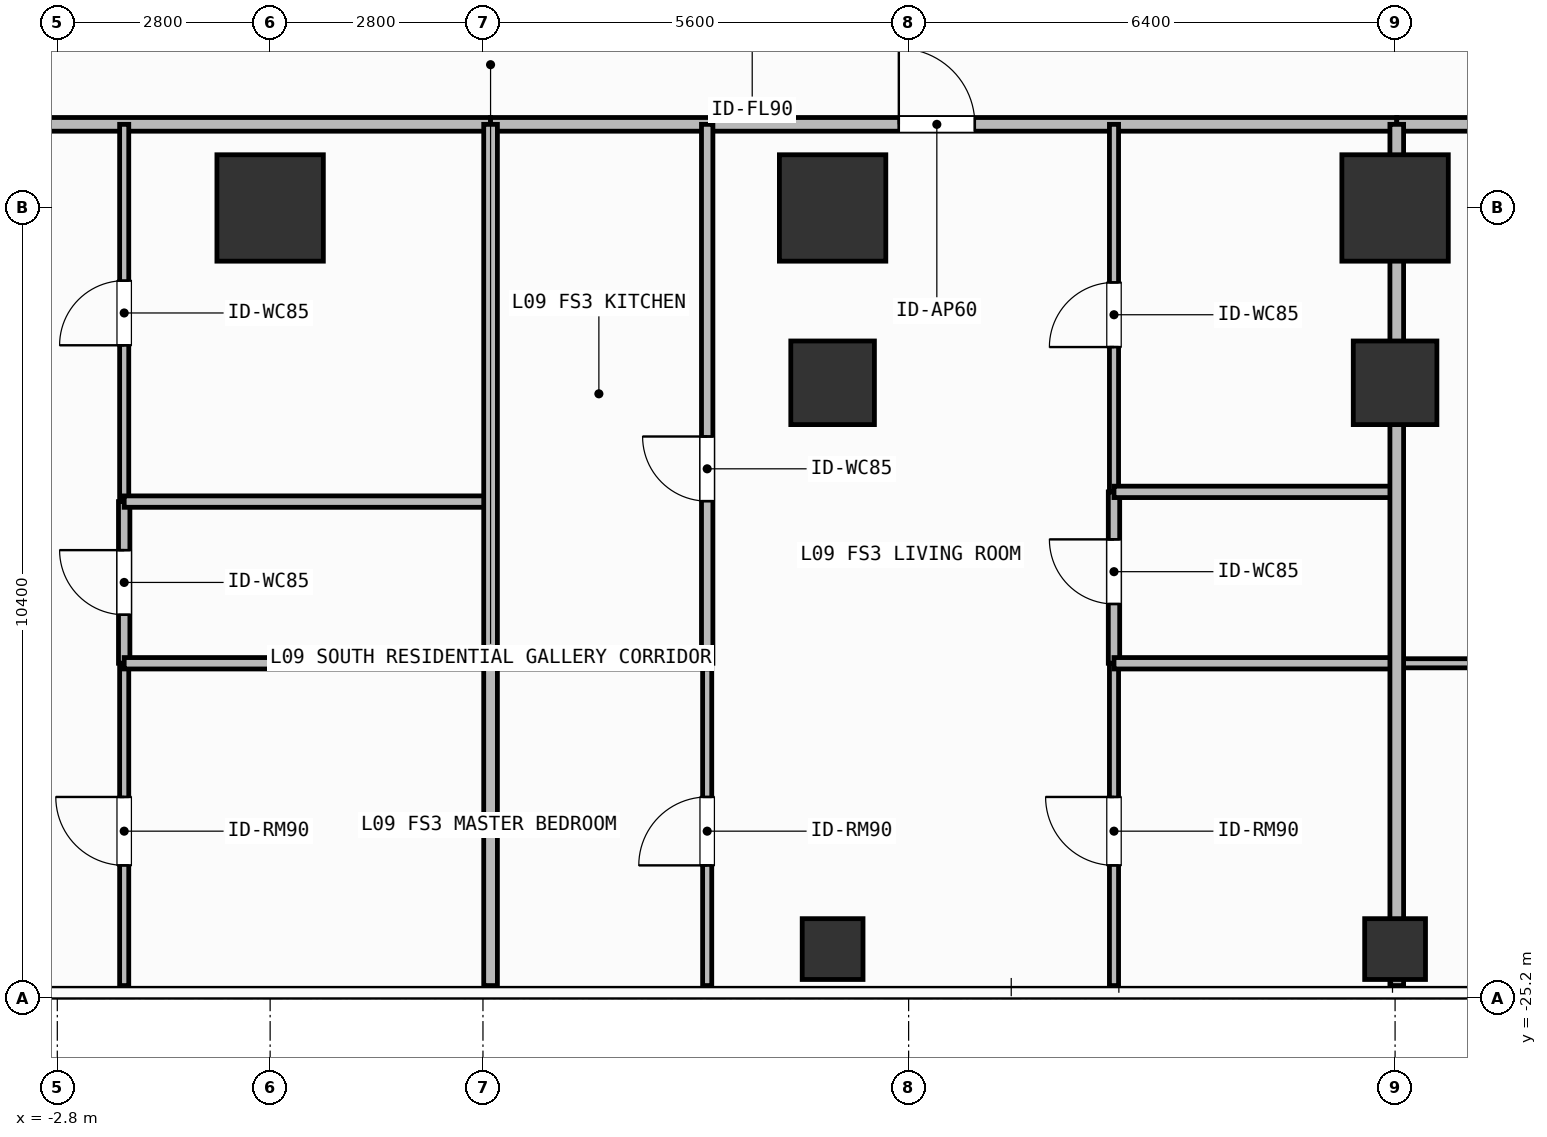
"""IFC4 building model, lengths in metres.
Left out: names, types, materials, properties, quantities, classifications, styles, units other than length and angle.
Written with IfcOpenShell. Run it as: python <this file> out.ifc"""

import sys

from ifc_helpers import new_model, si_unit, direction, frame, frame_2d, origin, origin_2d, place, context, subcontext, project, spatial, rectangle, hollow_rectangle, extrude, element, fill, save


model = new_model("IFC4")
c1 = context("Model", 3, precision=1e-05, world=origin(), true_north=direction((0.0, 1.0)))
c2 = subcontext(c1, "Body", "Model", "MODEL_VIEW")
j1 = project(units=[si_unit("LENGTHUNIT", "METRE"), si_unit("PLANEANGLEUNIT", "RADIAN")], contexts=[c1])
p1 = place(None, origin())
s1 = spatial("IfcSite", under=j1, at=p1, CompositionType="ELEMENT")
p2 = place(p1, origin())
s2 = spatial("IfcBuilding", under=s1, at=p2, CompositionType="ELEMENT")
p3 = place(p2, frame((0.0, 0.0, 34.5)))
s3 = spatial("IfcBuildingStorey", under=s2, at=p3, CompositionType="ELEMENT", Elevation=34.5)
for number, where, z_axis, x_axis in (
    (1, (0.0, -14.8, 0.0), (0.0, 0.0, 1.0), (1.0, 0.0, 0.0)),
    (2, (7.4, -14.8, 0.0), (0.0, 0.0, 1.0), (1.0, 0.0, 0.0)),
    (3, (14.8, -14.8, 0.0), (0.0, 0.0, 1.0), (1.0, 0.0, 0.0)),
):
    element("IfcColumn", number, at=place(p3, frame(where, z_axis=z_axis, x_axis=x_axis)), inside=s3, PredefinedType="COLUMN", context=c2, shape_type="SweptSolid", body=[
        extrude(rectangle(XDim=1.4, YDim=1.4, at=origin_2d()), origin(), (0.0, 0.0, 1.0), 3.9),
    ])
for number, where, z_axis, x_axis in (
    (4, (7.4, -17.1, 0.0), (0.0, 0.0, 1.0), (1.0, 0.0, 0.0)),
    (5, (14.8, -17.1, 0.0), (0.0, 0.0, 1.0), (1.0, 0.0, 0.0)),
):
    element("IfcColumn", number, at=place(p3, frame(where, z_axis=z_axis, x_axis=x_axis)), inside=s3, PredefinedType="COLUMN", context=c2, shape_type="SweptSolid", body=[
        extrude(rectangle(XDim=1.1, YDim=1.1, at=origin_2d()), origin(), (0.0, 0.0, 1.0), 3.9),
    ])
for number, where, z_axis, x_axis in (
    (6, (7.4, -24.55, 0.0), (0.0, 0.0, 1.0), (1.0, 0.0, 0.0)),
    (7, (14.8, -24.55, 0.0), (0.0, 0.0, 1.0), (1.0, 0.0, 0.0)),
):
    element("IfcColumn", number, at=place(p3, frame(where, z_axis=z_axis, x_axis=x_axis)), inside=s3, PredefinedType="COLUMN", context=c2, shape_type="SweptSolid", body=[
        extrude(hollow_rectangle(XDim=0.8, YDim=0.8, WallThickness=0.036, at=origin_2d()), origin(), (0.0, 0.0, 1.0), 3.9),
    ])
p4 = place(p3, frame((-9.151, -13.7, 0.0), z_axis=(0.0, 0.0, 1.0), x_axis=(1.0, 0.0, 0.0)))
e8 = element("IfcWall", 8, at=p4, inside=s3, PredefinedType="PARTITIONING", context=c2, shape_type="SweptSolid", body=[
    extrude(rectangle(XDim=12.051, YDim=0.18, at=frame_2d((6.025, 0.0))), origin(), (0.0, 0.0, 1.0), 3.68),
])
p5 = place(p4, frame((4.989, 0.0, 0.0)))
e9 = element("IfcOpeningElement", 9, at=p5, cuts=e8, PredefinedType="OPENING", context=c2, shape_type="SweptSolid", body=[
    extrude(rectangle(XDim=1.0, YDim=2.2, at=frame_2d((0.5, 1.1))), frame((0.0, 0.1, 0.0), z_axis=(0.0, -1.0, 0.0), x_axis=(1.0, 0.0, 0.0)), (0.0, 0.0, 1.0), 0.2),
])
p6 = place(p3, frame((-1.92, -20.79, 0.0), z_axis=(0.0, 0.0, 1.0), x_axis=(0.0, 1.0, 0.0)))
e10 = element("IfcWall", 10, at=p6, inside=s3, PredefinedType="PARTITIONING", context=c2, shape_type="SweptSolid", body=[
    extrude(rectangle(XDim=2.127, YDim=0.15, at=frame_2d((1.063, 0.0))), origin(), (0.0, 0.0, 1.0), 3.68),
])
p7 = place(p6, frame((0.638, 0.0, 0.0)))
e11 = element("IfcOpeningElement", 11, at=p7, cuts=e10, PredefinedType="OPENING", context=c2, shape_type="SweptSolid", body=[
    extrude(rectangle(XDim=0.85, YDim=2.1, at=frame_2d((0.425, 1.05))), frame((0.0, 0.085, 0.0), z_axis=(0.0, -1.0, 0.0), x_axis=(1.0, 0.0, 0.0)), (0.0, 0.0, 1.0), 0.17),
])
p8 = place(p3, frame((-1.92, -18.663, 0.0), z_axis=(0.0, 0.0, 1.0), x_axis=(0.0, 1.0, 0.0)))
e12 = element("IfcWall", 12, at=p8, inside=s3, PredefinedType="PARTITIONING", context=c2, shape_type="SweptSolid", body=[
    extrude(rectangle(XDim=4.963, YDim=0.12, at=frame_2d((2.481, 0.0))), origin(), (0.0, 0.0, 1.0), 3.68),
])
p9 = place(p8, frame((2.056, 0.0, 0.0)))
e13 = element("IfcOpeningElement", 13, at=p9, cuts=e12, PredefinedType="OPENING", context=c2, shape_type="SweptSolid", body=[
    extrude(rectangle(XDim=0.85, YDim=2.1, at=frame_2d((0.425, 1.05))), frame((0.0, 0.07, 0.0), z_axis=(0.0, -1.0, 0.0), x_axis=(1.0, 0.0, 0.0)), (0.0, 0.0, 1.0), 0.14),
])
p10 = place(p3, frame((-1.92, -25.03, 0.0), z_axis=(0.0, 0.0, 1.0), x_axis=(0.0, 1.0, 0.0)))
e14 = element("IfcWall", 14, at=p10, inside=s3, PredefinedType="PARTITIONING", context=c2, shape_type="SweptSolid", body=[
    extrude(rectangle(XDim=4.24, YDim=0.12, at=frame_2d((2.12, 0.0))), origin(), (0.0, 0.0, 1.0), 3.68),
])
p11 = place(p10, frame((1.581, 0.0, 0.0)))
e15 = element("IfcOpeningElement", 15, at=p11, cuts=e14, PredefinedType="OPENING", context=c2, shape_type="SweptSolid", body=[
    extrude(rectangle(XDim=0.9, YDim=2.1, at=frame_2d((0.45, 1.05))), frame((0.0, 0.07, 0.0), z_axis=(0.0, -1.0, 0.0), x_axis=(1.0, 0.0, 0.0)), (0.0, 0.0, 1.0), 0.14),
])
p12 = place(p3, frame((2.9, -13.7, 0.0), z_axis=(0.0, 0.0, 1.0), x_axis=(1.0, 0.0, 0.0)))
e16 = element("IfcWall", 16, at=p12, inside=s3, PredefinedType="PARTITIONING", context=c2, shape_type="SweptSolid", body=[
    extrude(rectangle(XDim=11.922, YDim=0.18, at=frame_2d((5.961, 0.0))), origin(), (0.0, 0.0, 1.0), 3.68),
])
p13 = place(p12, frame((5.371, 0.0, 0.0)))
e17 = element("IfcOpeningElement", 17, at=p13, cuts=e16, PredefinedType="OPENING", context=c2, shape_type="SweptSolid", body=[
    extrude(rectangle(XDim=1.0, YDim=2.2, at=frame_2d((0.5, 1.1))), frame((0.0, 0.1, 0.0), z_axis=(0.0, -1.0, 0.0), x_axis=(1.0, 0.0, 0.0)), (0.0, 0.0, 1.0), 0.2),
])
p14 = place(p3, frame((5.75, -20.79, 0.0), z_axis=(0.0, 0.0, 1.0), x_axis=(0.0, 1.0, 0.0)))
e18 = element("IfcWall", 18, at=p14, inside=s3, PredefinedType="PARTITIONING", context=c2, shape_type="SweptSolid", body=[
    extrude(rectangle(XDim=7.09, YDim=0.15, at=frame_2d((3.545, 0.0))), origin(), (0.0, 0.0, 1.0), 3.68),
])
p15 = place(p14, frame((2.133, 0.0, 0.0)))
e19 = element("IfcOpeningElement", 19, at=p15, cuts=e18, PredefinedType="OPENING", context=c2, shape_type="SweptSolid", body=[
    extrude(rectangle(XDim=0.85, YDim=2.1, at=frame_2d((0.425, 1.05))), frame((0.0, 0.085, 0.0), z_axis=(0.0, -1.0, 0.0), x_axis=(1.0, 0.0, 0.0)), (0.0, 0.0, 1.0), 0.17),
])
p16 = place(p3, frame((5.75, -25.03, 0.0), z_axis=(0.0, 0.0, 1.0), x_axis=(0.0, 1.0, 0.0)))
e20 = element("IfcWall", 20, at=p16, inside=s3, PredefinedType="PARTITIONING", context=c2, shape_type="SweptSolid", body=[
    extrude(rectangle(XDim=4.24, YDim=0.12, at=frame_2d((2.12, 0.0))), origin(), (0.0, 0.0, 1.0), 3.68),
])
p17 = place(p16, frame((1.581, 0.0, 0.0)))
e21 = element("IfcOpeningElement", 21, at=p17, cuts=e20, PredefinedType="OPENING", context=c2, shape_type="SweptSolid", body=[
    extrude(rectangle(XDim=0.9, YDim=2.1, at=frame_2d((0.45, 1.05))), frame((0.0, 0.07, 0.0), z_axis=(0.0, -1.0, 0.0), x_axis=(1.0, 0.0, 0.0)), (0.0, 0.0, 1.0), 0.14),
])
p18 = place(p3, frame((11.102, -20.79, 0.0), z_axis=(0.0, 0.0, 1.0), x_axis=(0.0, 1.0, 0.0)))
e22 = element("IfcWall", 22, at=p18, inside=s3, PredefinedType="PARTITIONING", context=c2, shape_type="SweptSolid", body=[
    extrude(rectangle(XDim=2.255, YDim=0.15, at=frame_2d((1.127, 0.0))), origin(), (0.0, 0.0, 1.0), 3.37),
])
p19 = place(p18, frame((0.78, 0.0, 0.0)))
e23 = element("IfcOpeningElement", 23, at=p19, cuts=e22, PredefinedType="OPENING", context=c2, shape_type="SweptSolid", body=[
    extrude(rectangle(XDim=0.85, YDim=2.1, at=frame_2d((0.425, 1.05))), frame((0.0, 0.085, 0.0), z_axis=(0.0, -1.0, 0.0), x_axis=(1.0, 0.0, 0.0)), (0.0, 0.0, 1.0), 0.17),
])
p20 = place(p3, frame((11.102, -18.535, 0.0), z_axis=(0.0, 0.0, 1.0), x_axis=(0.0, 1.0, 0.0)))
e24 = element("IfcWall", 24, at=p20, inside=s3, PredefinedType="PARTITIONING", context=c2, shape_type="SweptSolid", body=[
    extrude(rectangle(XDim=4.835, YDim=0.12, at=frame_2d((2.417, 0.0))), origin(), (0.0, 0.0, 1.0), 3.37),
])
p21 = place(p20, frame((1.905, 0.0, 0.0)))
e25 = element("IfcOpeningElement", 25, at=p21, cuts=e24, PredefinedType="OPENING", context=c2, shape_type="SweptSolid", body=[
    extrude(rectangle(XDim=0.85, YDim=2.1, at=frame_2d((0.425, 1.05))), frame((0.0, 0.07, 0.0), z_axis=(0.0, -1.0, 0.0), x_axis=(1.0, 0.0, 0.0)), (0.0, 0.0, 1.0), 0.14),
])
p22 = place(p3, frame((11.102, -25.03, 0.0), z_axis=(0.0, 0.0, 1.0), x_axis=(0.0, 1.0, 0.0)))
e26 = element("IfcWall", 26, at=p22, inside=s3, PredefinedType="PARTITIONING", context=c2, shape_type="SweptSolid", body=[
    extrude(rectangle(XDim=4.24, YDim=0.12, at=frame_2d((2.12, 0.0))), origin(), (0.0, 0.0, 1.0), 3.37),
])
p23 = place(p22, frame((1.581, 0.0, 0.0)))
e27 = element("IfcOpeningElement", 27, at=p23, cuts=e26, PredefinedType="OPENING", context=c2, shape_type="SweptSolid", body=[
    extrude(rectangle(XDim=0.9, YDim=2.1, at=frame_2d((0.45, 1.05))), frame((0.0, 0.07, 0.0), z_axis=(0.0, -1.0, 0.0), x_axis=(1.0, 0.0, 0.0)), (0.0, 0.0, 1.0), 0.14),
])
p24 = place(p3, frame((14.822, -13.7, 0.0), z_axis=(0.0, 0.0, 1.0), x_axis=(1.0, 0.0, 0.0)))
e28 = element("IfcWall", 28, at=p24, inside=s3, PredefinedType="PARTITIONING", context=c2, shape_type="SweptSolid", body=[
    extrude(rectangle(XDim=9.598, YDim=0.18, at=frame_2d((4.799, 0.0))), origin(), (0.0, 0.0, 1.0), 3.68),
])
p25 = place(p24, frame((2.859, 0.0, 0.0)))
e29 = element("IfcOpeningElement", 29, at=p25, cuts=e28, PredefinedType="OPENING", context=c2, shape_type="SweptSolid", body=[
    extrude(rectangle(XDim=1.0, YDim=2.2, at=frame_2d((0.5, 1.1))), frame((0.0, 0.1, 0.0), z_axis=(0.0, -1.0, 0.0), x_axis=(1.0, 0.0, 0.0)), (0.0, 0.0, 1.0), 0.2),
])
p26 = place(p3, frame((14.822, -20.79, 0.0), z_axis=(0.0, 0.0, 1.0), x_axis=(1.0, 0.0, 0.0)))
e30 = element("IfcWall", 30, at=p26, inside=s3, PredefinedType="PARTITIONING", context=c2, shape_type="SweptSolid", body=[
    extrude(rectangle(XDim=6.533, YDim=0.12, at=frame_2d((3.267, 0.0))), origin(), (0.0, 0.0, 1.0), 3.68),
])
p27 = place(p26, frame((2.816, 0.0, 0.0)))
e31 = element("IfcOpeningElement", 31, at=p27, cuts=e30, PredefinedType="OPENING", context=c2, shape_type="SweptSolid", body=[
    extrude(rectangle(XDim=0.9, YDim=2.1, at=frame_2d((0.45, 1.05))), frame((0.0, 0.07, 0.0), z_axis=(0.0, -1.0, 0.0), x_axis=(1.0, 0.0, 0.0)), (0.0, 0.0, 1.0), 0.14),
])
for number, where, z_axis, x_axis in (
    (32, (-1.92, -18.663, 0.0), (0.0, 0.0, 1.0), (1.0, 0.0, 0.0)),
    (33, (-1.92, -20.79, 0.0), (0.0, 0.0, 1.0), (1.0, 0.0, 0.0)),
):
    element("IfcWall", number, at=place(p3, frame(where, z_axis=z_axis, x_axis=x_axis)), inside=s3, PredefinedType="PARTITIONING", context=c2, shape_type="SweptSolid", body=[
        extrude(rectangle(XDim=4.82, YDim=0.15, at=frame_2d((2.41, 0.0))), origin(), (0.0, 0.0, 1.0), 3.68),
    ])
p28 = place(p3, frame((2.9, -20.79, 0.0), z_axis=(0.0, 0.0, 1.0), x_axis=(1.0, 0.0, 0.0)))
e34 = element("IfcWall", 34, at=p28, inside=s3, PredefinedType="PARTITIONING", context=c2, shape_type="SweptSolid", body=[
    extrude(rectangle(XDim=2.85, YDim=0.15, at=frame_2d((1.425, 0.0))), origin(), (0.0, 0.0, 1.0), 3.68),
])
for number, where, z_axis, x_axis in (
    (35, (11.102, -18.535, 0.0), (0.0, 0.0, 1.0), (1.0, 0.0, 0.0)),
    (36, (11.102, -20.79, 0.0), (0.0, 0.0, 1.0), (1.0, 0.0, 0.0)),
):
    element("IfcWall", number, at=place(p3, frame(where, z_axis=z_axis, x_axis=x_axis)), inside=s3, PredefinedType="PARTITIONING", context=c2, shape_type="SweptSolid", body=[
        extrude(rectangle(XDim=3.72, YDim=0.15, at=frame_2d((1.86, 0.0))), origin(), (0.0, 0.0, 1.0), 3.68),
    ])
p29 = place(p3, frame((2.9, -25.03, 0.0), z_axis=(0.0, 0.0, 1.0), x_axis=(0.0, 1.0, 0.0)))
e37 = element("IfcWall", 37, at=p29, inside=s3, PredefinedType="PARTITIONING", context=c2, shape_type="SweptSolid", body=[
    extrude(rectangle(XDim=11.33, YDim=0.18, at=frame_2d((5.665, 0.0))), origin(), (0.0, 0.0, 1.0), 3.68),
])
p30 = place(p3, frame((14.822, -25.03, 0.0), z_axis=(0.0, 0.0, 1.0), x_axis=(0.0, 1.0, 0.0)))
e38 = element("IfcWall", 38, at=p30, inside=s3, PredefinedType="PARTITIONING", context=c2, shape_type="SweptSolid", body=[
    extrude(rectangle(XDim=11.33, YDim=0.18, at=frame_2d((5.665, 0.0))), origin(), (0.0, 0.0, 1.0), 3.082),
])
p31 = place(p7, origin())
e39 = element("IfcDoor", 39, at=p31, inside=s3, OperationType="SINGLE_SWING_RIGHT", PredefinedType="DOOR", context=c2, shape_type="SweptSolid", body=[
    extrude(rectangle(XDim=0.85, YDim=2.1, at=frame_2d((0.425, 1.05))), frame((0.0, 0.025, 0.0), z_axis=(0.0, -1.0, 0.0), x_axis=(1.0, 0.0, 0.0)), (0.0, 0.0, 1.0), 0.05),
])
fill(e11, e39)
p32 = place(p9, origin())
e40 = element("IfcDoor", 40, at=p32, inside=s3, OperationType="SINGLE_SWING_LEFT", PredefinedType="DOOR", context=c2, shape_type="SweptSolid", body=[
    extrude(rectangle(XDim=0.85, YDim=2.1, at=frame_2d((0.425, 1.05))), frame((0.0, 0.025, 0.0), z_axis=(0.0, -1.0, 0.0), x_axis=(1.0, 0.0, 0.0)), (0.0, 0.0, 1.0), 0.05),
])
fill(e13, e40)
p33 = place(p11, origin())
e41 = element("IfcDoor", 41, at=p33, inside=s3, OperationType="SINGLE_SWING_RIGHT", PredefinedType="DOOR", context=c2, shape_type="SweptSolid", body=[
    extrude(rectangle(XDim=0.9, YDim=2.1, at=frame_2d((0.45, 1.05))), frame((0.0, 0.025, 0.0), z_axis=(0.0, -1.0, 0.0), x_axis=(1.0, 0.0, 0.0)), (0.0, 0.0, 1.0), 0.05),
])
fill(e15, e41)
p34 = place(p13, origin())
e42 = element("IfcDoor", 42, at=p34, inside=s3, OperationType="SINGLE_SWING_LEFT", PredefinedType="DOOR", context=c2, shape_type="SweptSolid", body=[
    extrude(rectangle(XDim=1.0, YDim=2.2, at=frame_2d((0.5, 1.1))), frame((0.0, 0.025, 0.0), z_axis=(0.0, -1.0, 0.0), x_axis=(1.0, 0.0, 0.0)), (0.0, 0.0, 1.0), 0.05),
])
fill(e17, e42)
p35 = place(p15, origin())
e43 = element("IfcDoor", 43, at=p35, inside=s3, OperationType="SINGLE_SWING_RIGHT", PredefinedType="DOOR", context=c2, shape_type="SweptSolid", body=[
    extrude(rectangle(XDim=0.85, YDim=2.1, at=frame_2d((0.425, 1.05))), frame((0.0, 0.025, 0.0), z_axis=(0.0, -1.0, 0.0), x_axis=(1.0, 0.0, 0.0)), (0.0, 0.0, 1.0), 0.05),
])
fill(e19, e43)
p36 = place(p17, origin())
e44 = element("IfcDoor", 44, at=p36, inside=s3, OperationType="SINGLE_SWING_LEFT", PredefinedType="DOOR", context=c2, shape_type="SweptSolid", body=[
    extrude(rectangle(XDim=0.9, YDim=2.1, at=frame_2d((0.45, 1.05))), frame((0.0, 0.025, 0.0), z_axis=(0.0, -1.0, 0.0), x_axis=(1.0, 0.0, 0.0)), (0.0, 0.0, 1.0), 0.05),
])
fill(e21, e44)
p37 = place(p19, origin())
e45 = element("IfcDoor", 45, at=p37, inside=s3, OperationType="SINGLE_SWING_RIGHT", PredefinedType="DOOR", context=c2, shape_type="SweptSolid", body=[
    extrude(rectangle(XDim=0.85, YDim=2.1, at=frame_2d((0.425, 1.05))), frame((0.0, 0.025, 0.0), z_axis=(0.0, -1.0, 0.0), x_axis=(1.0, 0.0, 0.0)), (0.0, 0.0, 1.0), 0.05),
])
fill(e23, e45)
p38 = place(p21, origin())
e46 = element("IfcDoor", 46, at=p38, inside=s3, OperationType="SINGLE_SWING_LEFT", PredefinedType="DOOR", context=c2, shape_type="SweptSolid", body=[
    extrude(rectangle(XDim=0.85, YDim=2.1, at=frame_2d((0.425, 1.05))), frame((0.0, 0.025, 0.0), z_axis=(0.0, -1.0, 0.0), x_axis=(1.0, 0.0, 0.0)), (0.0, 0.0, 1.0), 0.05),
])
fill(e25, e46)
p39 = place(p23, origin())
e47 = element("IfcDoor", 47, at=p39, inside=s3, OperationType="SINGLE_SWING_RIGHT", PredefinedType="DOOR", context=c2, shape_type="SweptSolid", body=[
    extrude(rectangle(XDim=0.9, YDim=2.1, at=frame_2d((0.45, 1.05))), frame((0.0, 0.025, 0.0), z_axis=(0.0, -1.0, 0.0), x_axis=(1.0, 0.0, 0.0)), (0.0, 0.0, 1.0), 0.05),
])
fill(e27, e47)
save(model, sys.argv[1])
